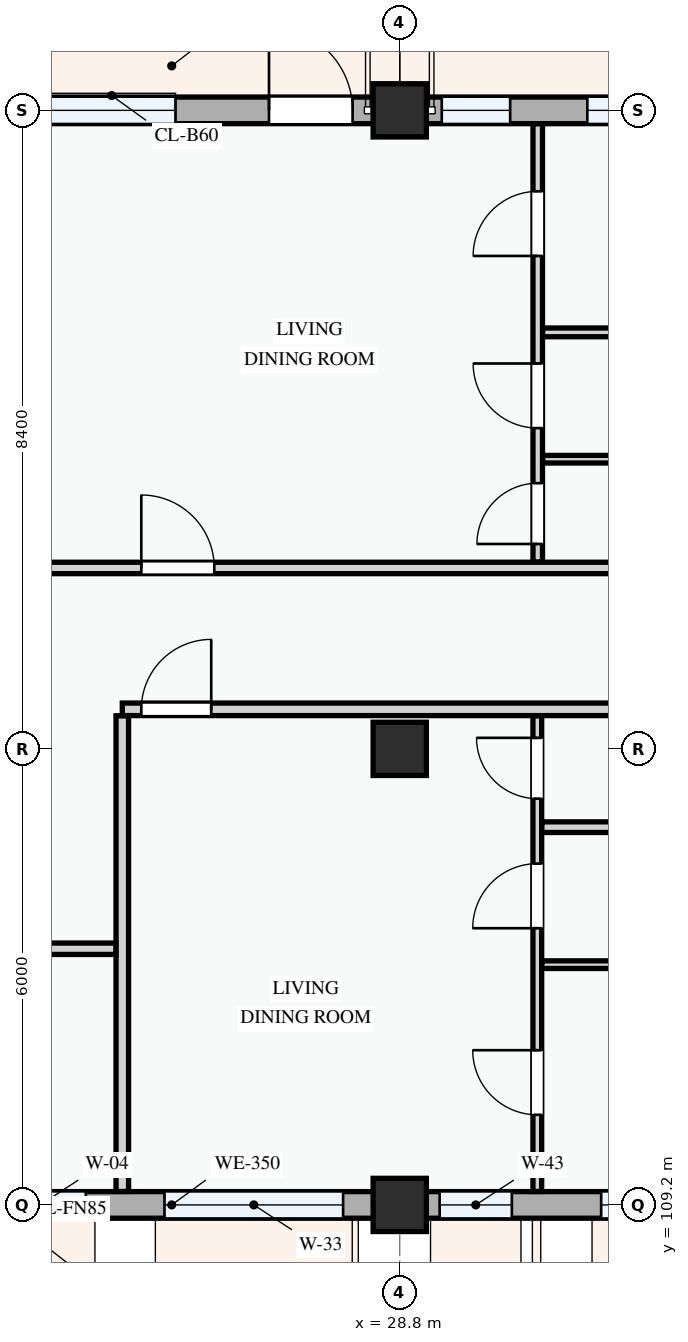
"""IFC4 building model, lengths in metres.
Left out: names, types, materials, properties, quantities, classifications, styles, units other than length and angle.
Written with IfcOpenShell. Run it as: python <this file> out.ifc"""

import sys

from ifc_helpers import new_model, si_unit, direction, frame, frame_2d, origin, origin_2d, place, context, subcontext, project, spatial, rectangle, extrude, element, fill, save


model = new_model("IFC4")
c1 = context("Model", 3, precision=1e-05, world=origin(), true_north=direction((0.0, 1.0)))
c2 = subcontext(c1, "Body", "Model", "MODEL_VIEW")
j1 = project(units=[si_unit("LENGTHUNIT", "METRE"), si_unit("PLANEANGLEUNIT", "RADIAN")], contexts=[c1])
p1 = place(None, origin())
s1 = spatial("IfcSite", under=j1, at=p1, CompositionType="ELEMENT")
p2 = place(p1, origin())
s2 = spatial("IfcBuilding", under=s1, at=p2, CompositionType="ELEMENT")
p3 = place(p2, frame((0.0, 0.0, 14.7)))
s3 = spatial("IfcBuildingStorey", under=s2, at=p3, CompositionType="ELEMENT", Elevation=14.7)
for number, where, z_axis, x_axis in (
    (1, (28.8, 109.2, 0.0), (0.0, 0.0, 1.0), (1.0, 0.0, 0.0)),
    (2, (28.8, 115.2, 0.0), (0.0, 0.0, 1.0), (1.0, 0.0, 0.0)),
    (3, (28.8, 123.6, 0.0), (0.0, 0.0, 1.0), (1.0, 0.0, 0.0)),
):
    element("IfcColumn", number, at=place(p3, frame(where, z_axis=z_axis, x_axis=x_axis)), inside=s3, PredefinedType="COLUMN", context=c2, shape_type="SweptSolid", body=[
        extrude(rectangle(XDim=0.7, YDim=0.7, at=origin_2d()), origin(), (0.0, 0.0, 1.0), 3.3),
    ])
p4 = place(p3, frame((22.8, 109.2, 0.0), z_axis=(0.0, 0.0, 1.0), x_axis=(1.0, 0.0, 0.0)))
e4 = element("IfcWall", 4, at=p4, inside=s3, PredefinedType="STANDARD", context=c2, shape_type="SweptSolid", body=[
    extrude(rectangle(XDim=6.0, YDim=0.35, at=frame_2d((3.0, 0.0))), origin(), (0.0, 0.0, 1.0), 2.475),
])
p5 = place(p4, frame((0.67, 0.0, 0.78)))
e5 = element("IfcOpeningElement", 5, at=p5, cuts=e4, PredefinedType="OPENING", context=c2, shape_type="SweptSolid", body=[
    extrude(rectangle(XDim=1.2, YDim=1.35, at=frame_2d((0.6, 0.675))), frame((0.0, 0.185, 0.0), z_axis=(0.0, -1.0, 0.0), x_axis=(1.0, 0.0, 0.0)), (0.0, 0.0, 1.0), 0.37),
])
p6 = place(p4, frame((2.905, 0.0, 0.78)))
e6 = element("IfcOpeningElement", 6, at=p6, cuts=e4, PredefinedType="OPENING", context=c2, shape_type="SweptSolid", body=[
    extrude(rectangle(XDim=2.35, YDim=1.55, at=frame_2d((1.175, 0.775))), frame((0.0, 0.185, 0.0), z_axis=(0.0, -1.0, 0.0), x_axis=(1.0, 0.0, 0.0)), (0.0, 0.0, 1.0), 0.37),
])
p7 = place(p3, frame((28.8, 109.2, 0.0), z_axis=(0.0, 0.0, 1.0), x_axis=(1.0, 0.0, 0.0)))
e7 = element("IfcWall", 7, at=p7, inside=s3, PredefinedType="STANDARD", context=c2, shape_type="SweptSolid", body=[
    extrude(rectangle(XDim=8.4, YDim=0.35, at=frame_2d((4.2, 0.0))), origin(), (0.0, 0.0, 1.0), 2.375),
])
p8 = place(p7, frame((0.525, 0.0, 0.78)))
e8 = element("IfcOpeningElement", 8, at=p8, cuts=e7, PredefinedType="OPENING", context=c2, shape_type="SweptSolid", body=[
    extrude(rectangle(XDim=0.95, YDim=1.15, at=frame_2d((0.475, 0.575))), frame((0.0, 0.185, 0.0), z_axis=(0.0, -1.0, 0.0), x_axis=(1.0, 0.0, 0.0)), (0.0, 0.0, 1.0), 0.37),
])
p9 = place(p7, frame((2.65, 0.0, 0.78)))
e9 = element("IfcOpeningElement", 9, at=p9, cuts=e7, PredefinedType="OPENING", context=c2, shape_type="SweptSolid", body=[
    extrude(rectangle(XDim=2.58, YDim=1.48, at=frame_2d((1.29, 0.74))), frame((0.0, 0.185, 0.0), z_axis=(0.0, -1.0, 0.0), x_axis=(1.0, 0.0, 0.0)), (0.0, 0.0, 1.0), 0.37),
])
p10 = place(p7, frame((6.44, 0.0, 0.78)))
e10 = element("IfcOpeningElement", 10, at=p10, cuts=e7, PredefinedType="OPENING", context=c2, shape_type="SweptSolid", body=[
    extrude(rectangle(XDim=1.4, YDim=1.45, at=frame_2d((0.7, 0.725))), frame((0.0, 0.185, 0.0), z_axis=(0.0, -1.0, 0.0), x_axis=(1.0, 0.0, 0.0)), (0.0, 0.0, 1.0), 0.37),
])
p11 = place(p3, frame((37.2, 123.6, 0.0), z_axis=(0.0, 0.0, 1.0), x_axis=(-1.0, 0.0, 0.0)))
e11 = element("IfcWall", 11, at=p11, inside=s3, PredefinedType="STANDARD", context=c2, shape_type="SweptSolid", body=[
    extrude(rectangle(XDim=8.4, YDim=0.35, at=frame_2d((4.2, 0.0))), origin(), (0.0, 0.0, 1.0), 2.345),
])
p12 = place(p11, frame((2.66, 0.0, 0.0)))
e12 = element("IfcOpeningElement", 12, at=p12, cuts=e11, PredefinedType="OPENING", context=c2, shape_type="SweptSolid", body=[
    extrude(rectangle(XDim=1.05, YDim=2.15, at=frame_2d((0.525, 1.075))), frame((0.0, 0.185, 0.0), z_axis=(0.0, -1.0, 0.0), x_axis=(1.0, 0.0, 0.0)), (0.0, 0.0, 1.0), 0.37),
])
p13 = place(p11, frame((0.5, 0.0, 0.78)))
e13 = element("IfcOpeningElement", 13, at=p13, cuts=e11, PredefinedType="OPENING", context=c2, shape_type="SweptSolid", body=[
    extrude(rectangle(XDim=1.52, YDim=1.42, at=frame_2d((0.76, 0.71))), frame((0.0, 0.185, 0.0), z_axis=(0.0, -1.0, 0.0), x_axis=(1.0, 0.0, 0.0)), (0.0, 0.0, 1.0), 0.37),
])
p14 = place(p11, frame((4.412, 0.0, 0.78)))
e14 = element("IfcOpeningElement", 14, at=p14, cuts=e11, PredefinedType="OPENING", context=c2, shape_type="SweptSolid", body=[
    extrude(rectangle(XDim=1.52, YDim=1.42, at=frame_2d((0.76, 0.71))), frame((0.0, 0.185, 0.0), z_axis=(0.0, -1.0, 0.0), x_axis=(1.0, 0.0, 0.0)), (0.0, 0.0, 1.0), 0.37),
])
p15 = place(p11, frame((6.947, 0.0, 0.78)))
e15 = element("IfcOpeningElement", 15, at=p15, cuts=e11, PredefinedType="OPENING", context=c2, shape_type="SweptSolid", body=[
    extrude(rectangle(XDim=0.9, YDim=1.2, at=frame_2d((0.45, 0.6))), frame((0.0, 0.185, 0.0), z_axis=(0.0, -1.0, 0.0), x_axis=(1.0, 0.0, 0.0)), (0.0, 0.0, 1.0), 0.37),
])
p16 = place(p3, frame((28.8, 123.6, 0.0), z_axis=(0.0, 0.0, 1.0), x_axis=(-1.0, 0.0, 0.0)))
e16 = element("IfcWall", 16, at=p16, inside=s3, PredefinedType="STANDARD", context=c2, shape_type="SweptSolid", body=[
    extrude(rectangle(XDim=6.0, YDim=0.35, at=frame_2d((3.0, 0.0))), origin(), (0.0, 0.0, 1.0), 2.445),
])
p17 = place(p16, frame((0.62, 0.0, 0.0)))
e17 = element("IfcOpeningElement", 17, at=p17, cuts=e16, PredefinedType="OPENING", context=c2, shape_type="SweptSolid", body=[
    extrude(rectangle(XDim=1.1, YDim=2.15, at=frame_2d((0.55, 1.075))), frame((0.0, 0.185, 0.0), z_axis=(0.0, -1.0, 0.0), x_axis=(1.0, 0.0, 0.0)), (0.0, 0.0, 1.0), 0.37),
])
p18 = place(p16, frame((2.95, 0.0, 0.78)))
e18 = element("IfcOpeningElement", 18, at=p18, cuts=e16, PredefinedType="OPENING", context=c2, shape_type="SweptSolid", body=[
    extrude(rectangle(XDim=1.68, YDim=1.46, at=frame_2d((0.84, 0.73))), frame((0.0, 0.185, 0.0), z_axis=(0.0, -1.0, 0.0), x_axis=(1.0, 0.0, 0.0)), (0.0, 0.0, 1.0), 0.37),
])
p19 = place(p3, frame((25.15, 109.377, 0.0), z_axis=(0.0, 0.0, 1.0), x_axis=(0.0, 1.0, 0.0)))
e19 = element("IfcWall", 19, at=p19, inside=s3, PredefinedType="PARTITIONING", context=c2, shape_type="SweptSolid", body=[
    extrude(rectangle(XDim=6.259, YDim=0.165, at=frame_2d((3.129, 0.0))), origin(), (0.0, 0.0, 1.0), 3.0),
])
p20 = place(p3, frame((22.66, 112.57, 0.0), z_axis=(0.0, 0.0, 1.0), x_axis=(1.0, 0.0, 0.0)))
e20 = element("IfcWall", 20, at=p20, inside=s3, PredefinedType="PARTITIONING", context=c2, shape_type="SweptSolid", body=[
    extrude(rectangle(XDim=2.406, YDim=0.15, at=frame_2d((1.203, 0.0))), origin(), (0.0, 0.0, 1.0), 3.0),
])
p21 = place(p3, frame((30.61, 109.377, 0.0), z_axis=(0.0, 0.0, 1.0), x_axis=(0.0, 1.0, 0.0)))
e21 = element("IfcWall", 21, at=p21, inside=s3, PredefinedType="PARTITIONING", context=c2, shape_type="SweptSolid", body=[
    extrude(rectangle(XDim=6.259, YDim=0.115, at=frame_2d((3.129, 0.0))), origin(), (0.0, 0.0, 1.0), 3.0),
])
p22 = place(p21, frame((1.008, 0.0, 0.0)))
e22 = element("IfcOpeningElement", 22, at=p22, cuts=e21, PredefinedType="OPENING", context=c2, shape_type="SweptSolid", body=[
    extrude(rectangle(XDim=0.85, YDim=2.1, at=frame_2d((0.425, 1.05))), frame((0.0, 0.067, 0.0), z_axis=(0.0, -1.0, 0.0), x_axis=(1.0, 0.0, 0.0)), (0.0, 0.0, 1.0), 0.135),
])
p23 = place(p21, frame((3.463, 0.0, 0.0)))
e23 = element("IfcOpeningElement", 23, at=p23, cuts=e21, PredefinedType="OPENING", context=c2, shape_type="SweptSolid", body=[
    extrude(rectangle(XDim=0.85, YDim=2.1, at=frame_2d((0.425, 1.05))), frame((0.0, 0.067, 0.0), z_axis=(0.0, -1.0, 0.0), x_axis=(1.0, 0.0, 0.0)), (0.0, 0.0, 1.0), 0.135),
])
p24 = place(p21, frame((5.168, 0.0, 0.0)))
e24 = element("IfcOpeningElement", 24, at=p24, cuts=e21, PredefinedType="OPENING", context=c2, shape_type="SweptSolid", body=[
    extrude(rectangle(XDim=0.8, YDim=2.1, at=frame_2d((0.4, 1.05))), frame((0.0, 0.067, 0.0), z_axis=(0.0, -1.0, 0.0), x_axis=(1.0, 0.0, 0.0)), (0.0, 0.0, 1.0), 0.135),
])
p25 = place(p3, frame((30.669, 112.361, 0.0), z_axis=(0.0, 0.0, 1.0), x_axis=(1.0, 0.0, 0.0)))
e25 = element("IfcWall", 25, at=p25, inside=s3, PredefinedType="PARTITIONING", context=c2, shape_type="SweptSolid", body=[
    extrude(rectangle(XDim=4.106, YDim=0.1, at=frame_2d((2.053, 0.0))), origin(), (0.0, 0.0, 1.0), 3.0),
])
p26 = place(p3, frame((30.669, 114.17, 0.0), z_axis=(0.0, 0.0, 1.0), x_axis=(1.0, 0.0, 0.0)))
e26 = element("IfcWall", 26, at=p26, inside=s3, PredefinedType="PARTITIONING", context=c2, shape_type="SweptSolid", body=[
    extrude(rectangle(XDim=4.106, YDim=0.14, at=frame_2d((2.053, 0.0))), origin(), (0.0, 0.0, 1.0), 3.0),
])
p27 = place(p3, frame((30.615, 117.657, 0.0), z_axis=(0.0, 0.0, 1.0), x_axis=(0.0, 1.0, 0.0)))
e27 = element("IfcWall", 27, at=p27, inside=s3, PredefinedType="PARTITIONING", context=c2, shape_type="SweptSolid", body=[
    extrude(rectangle(XDim=5.766, YDim=0.125, at=frame_2d((2.883, 0.0))), origin(), (0.0, 0.0, 1.0), 3.0),
])
p28 = place(p27, frame((0.238, 0.0, 0.0)))
e28 = element("IfcOpeningElement", 28, at=p28, cuts=e27, PredefinedType="OPENING", context=c2, shape_type="SweptSolid", body=[
    extrude(rectangle(XDim=0.8, YDim=2.1, at=frame_2d((0.4, 1.05))), frame((0.0, 0.073, 0.0), z_axis=(0.0, -1.0, 0.0), x_axis=(1.0, 0.0, 0.0)), (0.0, 0.0, 1.0), 0.145),
])
p29 = place(p27, frame((1.763, 0.0, 0.0)))
e29 = element("IfcOpeningElement", 29, at=p29, cuts=e27, PredefinedType="OPENING", context=c2, shape_type="SweptSolid", body=[
    extrude(rectangle(XDim=0.85, YDim=2.1, at=frame_2d((0.425, 1.05))), frame((0.0, 0.073, 0.0), z_axis=(0.0, -1.0, 0.0), x_axis=(1.0, 0.0, 0.0)), (0.0, 0.0, 1.0), 0.145),
])
p30 = place(p27, frame((4.028, 0.0, 0.0)))
e30 = element("IfcOpeningElement", 30, at=p30, cuts=e27, PredefinedType="OPENING", context=c2, shape_type="SweptSolid", body=[
    extrude(rectangle(XDim=0.85, YDim=2.1, at=frame_2d((0.425, 1.05))), frame((0.0, 0.073, 0.0), z_axis=(0.0, -1.0, 0.0), x_axis=(1.0, 0.0, 0.0)), (0.0, 0.0, 1.0), 0.145),
])
p31 = place(p3, frame((30.68, 120.679, 0.0), z_axis=(0.0, 0.0, 1.0), x_axis=(1.0, 0.0, 0.0)))
e31 = element("IfcWall", 31, at=p31, inside=s3, PredefinedType="PARTITIONING", context=c2, shape_type="SweptSolid", body=[
    extrude(rectangle(XDim=4.088, YDim=0.115, at=frame_2d((2.044, 0.0))), origin(), (0.0, 0.0, 1.0), 3.0),
])
p32 = place(p3, frame((30.68, 119.01, 0.0), z_axis=(0.0, 0.0, 1.0), x_axis=(1.0, 0.0, 0.0)))
e32 = element("IfcWall", 32, at=p32, inside=s3, PredefinedType="PARTITIONING", context=c2, shape_type="SweptSolid", body=[
    extrude(rectangle(XDim=4.088, YDim=0.1, at=frame_2d((2.044, 0.0))), origin(), (0.0, 0.0, 1.0), 3.0),
])
p33 = place(p3, frame((25.15, 115.72, 0.0), z_axis=(0.0, 0.0, 1.0), x_axis=(1.0, 0.0, 0.0)))
e33 = element("IfcWall", 33, at=p33, inside=s3, PredefinedType="PARTITIONING", context=c2, shape_type="SweptSolid", body=[
    extrude(rectangle(XDim=32.273, YDim=0.165, at=frame_2d((16.137, 0.0))), origin(), (0.0, 0.0, 1.0), 3.0),
])
p34 = place(p33, frame((0.25, 0.0, 0.0)))
e34 = element("IfcOpeningElement", 34, at=p34, cuts=e33, PredefinedType="OPENING", context=c2, shape_type="SweptSolid", body=[
    extrude(rectangle(XDim=0.92, YDim=2.1, at=frame_2d((0.46, 1.05))), frame((0.0, 0.093, 0.0), z_axis=(0.0, -1.0, 0.0), x_axis=(1.0, 0.0, 0.0)), (0.0, 0.0, 1.0), 0.185),
])
p35 = place(p33, frame((14.015, 0.0, 0.0)))
e35 = element("IfcOpeningElement", 35, at=p35, cuts=e33, PredefinedType="OPENING", context=c2, shape_type="SweptSolid", body=[
    extrude(rectangle(XDim=0.92, YDim=2.1, at=frame_2d((0.46, 1.05))), frame((0.0, 0.093, 0.0), z_axis=(0.0, -1.0, 0.0), x_axis=(1.0, 0.0, 0.0)), (0.0, 0.0, 1.0), 0.185),
])
p36 = place(p33, frame((21.739, 0.0, 0.0)))
e36 = element("IfcOpeningElement", 36, at=p36, cuts=e33, PredefinedType="OPENING", context=c2, shape_type="SweptSolid", body=[
    extrude(rectangle(XDim=0.92, YDim=2.1, at=frame_2d((0.46, 1.05))), frame((0.0, 0.093, 0.0), z_axis=(0.0, -1.0, 0.0), x_axis=(1.0, 0.0, 0.0)), (0.0, 0.0, 1.0), 0.185),
])
p37 = place(p3, frame((22.66, 117.58, 0.0), z_axis=(0.0, 0.0, 1.0), x_axis=(1.0, 0.0, 0.0)))
e37 = element("IfcWall", 37, at=p37, inside=s3, PredefinedType="PARTITIONING", context=c2, shape_type="SweptSolid", body=[
    extrude(rectangle(XDim=34.763, YDim=0.15, at=frame_2d((17.382, 0.0))), origin(), (0.0, 0.0, 1.0), 3.0),
])
p38 = place(p37, frame((2.74, 0.0, 0.0)))
e38 = element("IfcOpeningElement", 38, at=p38, cuts=e37, PredefinedType="OPENING", context=c2, shape_type="SweptSolid", body=[
    extrude(rectangle(XDim=0.96, YDim=2.12, at=frame_2d((0.48, 1.06))), frame((0.0, 0.085, 0.0), z_axis=(0.0, -1.0, 0.0), x_axis=(1.0, 0.0, 0.0)), (0.0, 0.0, 1.0), 0.17),
])
p39 = place(p37, frame((16.285, 0.0, 0.0)))
e39 = element("IfcOpeningElement", 39, at=p39, cuts=e37, PredefinedType="OPENING", context=c2, shape_type="SweptSolid", body=[
    extrude(rectangle(XDim=0.92, YDim=2.1, at=frame_2d((0.46, 1.05))), frame((0.0, 0.085, 0.0), z_axis=(0.0, -1.0, 0.0), x_axis=(1.0, 0.0, 0.0)), (0.0, 0.0, 1.0), 0.17),
])
p40 = place(p37, frame((24.263, 0.0, 0.0)))
e40 = element("IfcOpeningElement", 40, at=p40, cuts=e37, PredefinedType="OPENING", context=c2, shape_type="SweptSolid", body=[
    extrude(rectangle(XDim=0.92, YDim=2.1, at=frame_2d((0.46, 1.05))), frame((0.0, 0.085, 0.0), z_axis=(0.0, -1.0, 0.0), x_axis=(1.0, 0.0, 0.0)), (0.0, 0.0, 1.0), 0.17),
])
p41 = place(p5, origin())
e41 = element("IfcWindow", 41, at=p41, inside=s3, PartitioningType="SINGLE_PANEL", PredefinedType="WINDOW", context=c2, shape_type="SweptSolid", body=[
    extrude(rectangle(XDim=1.2, YDim=1.35, at=frame_2d((0.6, 0.675))), frame((0.0, 0.03, 0.0), z_axis=(0.0, -1.0, 0.0), x_axis=(1.0, 0.0, 0.0)), (0.0, 0.0, 1.0), 0.06),
])
fill(e5, e41)
p42 = place(p6, origin())
e42 = element("IfcWindow", 42, at=p42, inside=s3, PartitioningType="DOUBLE_PANEL_VERTICAL", PredefinedType="WINDOW", context=c2, shape_type="SweptSolid", body=[
    extrude(rectangle(XDim=2.35, YDim=1.55, at=frame_2d((1.175, 0.775))), frame((0.0, 0.03, 0.0), z_axis=(0.0, -1.0, 0.0), x_axis=(1.0, 0.0, 0.0)), (0.0, 0.0, 1.0), 0.06),
])
fill(e6, e42)
p43 = place(p8, origin())
e43 = element("IfcWindow", 43, at=p43, inside=s3, PartitioningType="SINGLE_PANEL", PredefinedType="WINDOW", context=c2, shape_type="SweptSolid", body=[
    extrude(rectangle(XDim=0.95, YDim=1.15, at=frame_2d((0.475, 0.575))), frame((0.0, 0.03, 0.0), z_axis=(0.0, -1.0, 0.0), x_axis=(1.0, 0.0, 0.0)), (0.0, 0.0, 1.0), 0.06),
])
fill(e8, e43)
p44 = place(p9, origin())
e44 = element("IfcWindow", 44, at=p44, inside=s3, PartitioningType="DOUBLE_PANEL_VERTICAL", PredefinedType="WINDOW", context=c2, shape_type="SweptSolid", body=[
    extrude(rectangle(XDim=2.58, YDim=1.48, at=frame_2d((1.29, 0.74))), frame((0.0, 0.03, 0.0), z_axis=(0.0, -1.0, 0.0), x_axis=(1.0, 0.0, 0.0)), (0.0, 0.0, 1.0), 0.06),
])
fill(e9, e44)
p45 = place(p14, origin())
e45 = element("IfcWindow", 45, at=p45, inside=s3, PartitioningType="SINGLE_PANEL", PredefinedType="WINDOW", context=c2, shape_type="SweptSolid", body=[
    extrude(rectangle(XDim=1.52, YDim=1.42, at=frame_2d((0.76, 0.71))), frame((0.0, 0.03, 0.0), z_axis=(0.0, -1.0, 0.0), x_axis=(1.0, 0.0, 0.0)), (0.0, 0.0, 1.0), 0.06),
])
fill(e14, e45)
p46 = place(p15, origin())
e46 = element("IfcWindow", 46, at=p46, inside=s3, PartitioningType="SINGLE_PANEL", PredefinedType="WINDOW", context=c2, shape_type="SweptSolid", body=[
    extrude(rectangle(XDim=0.9, YDim=1.2, at=frame_2d((0.45, 0.6))), frame((0.0, 0.03, 0.0), z_axis=(0.0, -1.0, 0.0), x_axis=(1.0, 0.0, 0.0)), (0.0, 0.0, 1.0), 0.06),
])
fill(e15, e46)
p47 = place(p17, frame((1.1, 0.0, 0.0), z_axis=(0.0, 0.0, 1.0), x_axis=(-1.0, 0.0, 0.0)))
e47 = element("IfcDoor", 47, at=p47, inside=s3, OperationType="SINGLE_SWING_LEFT", PredefinedType="DOOR", context=c2, shape_type="SweptSolid", body=[
    extrude(rectangle(XDim=1.1, YDim=2.15, at=frame_2d((0.55, 1.075))), frame((0.0, 0.025, 0.0), z_axis=(0.0, -1.0, 0.0), x_axis=(1.0, 0.0, 0.0)), (0.0, 0.0, 1.0), 0.05),
])
fill(e17, e47)
p48 = place(p18, origin())
e48 = element("IfcWindow", 48, at=p48, inside=s3, PartitioningType="DOUBLE_PANEL_VERTICAL", PredefinedType="WINDOW", context=c2, shape_type="SweptSolid", body=[
    extrude(rectangle(XDim=1.68, YDim=1.46, at=frame_2d((0.84, 0.73))), frame((0.0, 0.03, 0.0), z_axis=(0.0, -1.0, 0.0), x_axis=(1.0, 0.0, 0.0)), (0.0, 0.0, 1.0), 0.06),
])
fill(e18, e48)
p49 = place(p22, origin())
e49 = element("IfcDoor", 49, at=p49, inside=s3, OperationType="SINGLE_SWING_RIGHT", PredefinedType="DOOR", context=c2, shape_type="SweptSolid", body=[
    extrude(rectangle(XDim=0.85, YDim=2.1, at=frame_2d((0.425, 1.05))), frame((0.0, 0.025, 0.0), z_axis=(0.0, -1.0, 0.0), x_axis=(1.0, 0.0, 0.0)), (0.0, 0.0, 1.0), 0.05),
])
fill(e22, e49)
p50 = place(p23, origin())
e50 = element("IfcDoor", 50, at=p50, inside=s3, OperationType="SINGLE_SWING_LEFT", PredefinedType="DOOR", context=c2, shape_type="SweptSolid", body=[
    extrude(rectangle(XDim=0.85, YDim=2.1, at=frame_2d((0.425, 1.05))), frame((0.0, 0.025, 0.0), z_axis=(0.0, -1.0, 0.0), x_axis=(1.0, 0.0, 0.0)), (0.0, 0.0, 1.0), 0.05),
])
fill(e23, e50)
p51 = place(p24, origin())
e51 = element("IfcDoor", 51, at=p51, inside=s3, OperationType="SINGLE_SWING_RIGHT", PredefinedType="DOOR", context=c2, shape_type="SweptSolid", body=[
    extrude(rectangle(XDim=0.8, YDim=2.1, at=frame_2d((0.4, 1.05))), frame((0.0, 0.025, 0.0), z_axis=(0.0, -1.0, 0.0), x_axis=(1.0, 0.0, 0.0)), (0.0, 0.0, 1.0), 0.05),
])
fill(e24, e51)
p52 = place(p28, origin())
e52 = element("IfcDoor", 52, at=p52, inside=s3, OperationType="SINGLE_SWING_LEFT", PredefinedType="DOOR", context=c2, shape_type="SweptSolid", body=[
    extrude(rectangle(XDim=0.8, YDim=2.1, at=frame_2d((0.4, 1.05))), frame((0.0, 0.025, 0.0), z_axis=(0.0, -1.0, 0.0), x_axis=(1.0, 0.0, 0.0)), (0.0, 0.0, 1.0), 0.05),
])
fill(e28, e52)
p53 = place(p29, origin())
e53 = element("IfcDoor", 53, at=p53, inside=s3, OperationType="SINGLE_SWING_RIGHT", PredefinedType="DOOR", context=c2, shape_type="SweptSolid", body=[
    extrude(rectangle(XDim=0.85, YDim=2.1, at=frame_2d((0.425, 1.05))), frame((0.0, 0.025, 0.0), z_axis=(0.0, -1.0, 0.0), x_axis=(1.0, 0.0, 0.0)), (0.0, 0.0, 1.0), 0.05),
])
fill(e29, e53)
p54 = place(p30, origin())
e54 = element("IfcDoor", 54, at=p54, inside=s3, OperationType="SINGLE_SWING_LEFT", PredefinedType="DOOR", context=c2, shape_type="SweptSolid", body=[
    extrude(rectangle(XDim=0.85, YDim=2.1, at=frame_2d((0.425, 1.05))), frame((0.0, 0.025, 0.0), z_axis=(0.0, -1.0, 0.0), x_axis=(1.0, 0.0, 0.0)), (0.0, 0.0, 1.0), 0.05),
])
fill(e30, e54)
p55 = place(p34, origin())
e55 = element("IfcDoor", 55, at=p55, inside=s3, OperationType="SINGLE_SWING_RIGHT", PredefinedType="DOOR", context=c2, shape_type="SweptSolid", body=[
    extrude(rectangle(XDim=0.92, YDim=2.1, at=frame_2d((0.46, 1.05))), frame((0.0, 0.025, 0.0), z_axis=(0.0, -1.0, 0.0), x_axis=(1.0, 0.0, 0.0)), (0.0, 0.0, 1.0), 0.05),
])
fill(e34, e55)
p56 = place(p38, origin())
e56 = element("IfcDoor", 56, at=p56, inside=s3, OperationType="SINGLE_SWING_LEFT", PredefinedType="DOOR", context=c2, shape_type="SweptSolid", body=[
    extrude(rectangle(XDim=0.96, YDim=2.12, at=frame_2d((0.48, 1.06))), frame((0.0, 0.025, 0.0), z_axis=(0.0, -1.0, 0.0), x_axis=(1.0, 0.0, 0.0)), (0.0, 0.0, 1.0), 0.05),
])
fill(e38, e56)
save(model, sys.argv[1])
